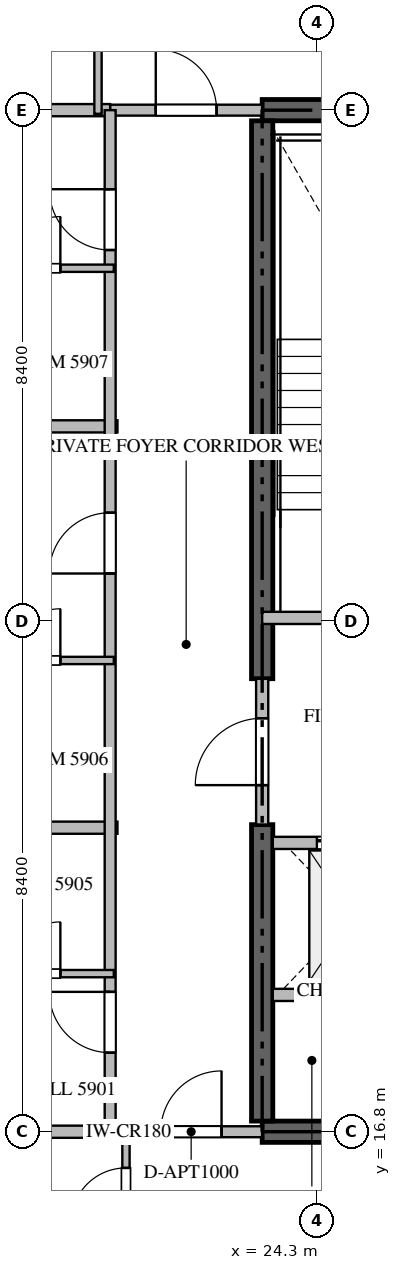
"""IFC4 building model, lengths in metres.
Left out: names, types, materials, properties, quantities, classifications, styles, units other than length and angle.
Written with IfcOpenShell. Run it as: python <this file> out.ifc"""

import sys

from ifc_helpers import new_model, si_unit, direction, frame, frame_2d, origin, place, context, subcontext, project, spatial, rectangle, extrude, source, transform, mapped, element, fill, save


model = new_model("IFC4")
c1 = context("Model", 3, precision=1e-05, world=origin(), true_north=direction((0.0, 1.0)))
c2 = subcontext(c1, "Body", "Model", "MODEL_VIEW")
j1 = project(units=[si_unit("LENGTHUNIT", "METRE"), si_unit("PLANEANGLEUNIT", "RADIAN")], contexts=[c1])
p1 = place(None, origin())
s1 = spatial("IfcSite", under=j1, at=p1, CompositionType="ELEMENT")
p2 = place(p1, origin())
s2 = spatial("IfcBuilding", under=s1, at=p2, CompositionType="ELEMENT")
p3 = place(p2, frame((0.0, 0.0, 237.4)))
s3 = spatial("IfcBuildingStorey", under=s2, at=p3, CompositionType="ELEMENT", Elevation=237.4)
for number, where, z_axis, x_axis in (
    (1, (23.4, 16.8, -0.26), (0.0, 0.0, 1.0), (1.0, 0.0, 0.0)),
    (2, (41.4, 33.6, -0.26), (0.0, 0.0, 1.0), (-1.0, 0.0, 0.0)),
):
    element("IfcWall", number, at=place(p3, frame(where, z_axis=z_axis, x_axis=x_axis)), inside=s3, PredefinedType="SHEAR", context=c2, shape_type="SweptSolid", body=[
        extrude(rectangle(XDim=18.0, YDim=0.35, at=frame_2d((9.0, 0.0))), origin(), (0.0, 0.0, 1.0), 3.848),
    ])
p4 = place(p3, frame((23.4, 16.975, -0.26), z_axis=(0.0, 0.0, 1.0), x_axis=(0.0, 1.0, 0.0)))
e3 = element("IfcWall", 3, at=p4, inside=s3, PredefinedType="SHEAR", context=c2, shape_type="SweptSolid", body=[
    extrude(rectangle(XDim=4.875, YDim=0.35, at=frame_2d((2.438, 0.0))), origin(), (0.0, 0.0, 1.0), 3.848),
])
p5 = place(p3, frame((23.4, 24.25, -0.26), z_axis=(0.0, 0.0, 1.0), x_axis=(0.0, 1.0, 0.0)))
e4 = element("IfcWall", 4, at=p5, inside=s3, PredefinedType="SHEAR", context=c2, shape_type="SweptSolid", body=[
    extrude(rectangle(XDim=9.175, YDim=0.35, at=frame_2d((4.587, 0.0))), origin(), (0.0, 0.0, 1.0), 3.848),
])
p6 = place(p3, frame((23.4, 25.25, 0.0), z_axis=(0.0, 0.0, 1.0), x_axis=(1.0, 0.0, 0.0)))
e5 = element("IfcWall", 5, at=p6, inside=s3, PredefinedType="STANDARD", context=c2, shape_type="SweptSolid", body=[
    extrude(rectangle(XDim=4.45, YDim=0.2, at=frame_2d((2.225, 0.0))), origin(), (0.0, 0.0, 1.0), 3.59),
])
p7 = place(p6, frame((1.65, 0.0, 0.0)))
e6 = element("IfcOpeningElement", 6, at=p7, cuts=e5, PredefinedType="OPENING", context=c2, shape_type="SweptSolid", body=[
    extrude(rectangle(XDim=1.1, YDim=2.15, at=frame_2d((0.55, 1.075))), frame((0.0, 0.11, 0.0), z_axis=(0.0, -1.0, 0.0), x_axis=(1.0, 0.0, 0.0)), (0.0, 0.0, 1.0), 0.22),
])
p8 = place(p3, frame((23.575, 21.55, 0.0), z_axis=(0.0, 0.0, 1.0), x_axis=(1.0, 0.0, 0.0)))
e7 = element("IfcWall", 7, at=p8, inside=s3, PredefinedType="STANDARD", context=c2, shape_type="SweptSolid", body=[
    extrude(rectangle(XDim=2.475, YDim=0.2, at=frame_2d((1.238, 0.0))), origin(), (0.0, 0.0, 1.0), 3.59),
])
p9 = place(p8, frame((0.725, 0.0, 0.0)))
e8 = element("IfcOpeningElement", 8, at=p9, cuts=e7, PredefinedType="OPENING", context=c2, shape_type="SweptSolid", body=[
    extrude(rectangle(XDim=1.2, YDim=2.2, at=frame_2d((0.6, 1.1))), frame((0.0, 0.11, 0.0), z_axis=(0.0, -1.0, 0.0), x_axis=(1.0, 0.0, 0.0)), (0.0, 0.0, 1.0), 0.22),
])
p10 = place(p3, frame((23.575, 19.05, 0.0), z_axis=(0.0, 0.0, 1.0), x_axis=(1.0, 0.0, 0.0)))
e9 = element("IfcWall", 9, at=p10, inside=s3, PredefinedType="STANDARD", context=c2, shape_type="SweptSolid", body=[
    extrude(rectangle(XDim=2.475, YDim=0.2, at=frame_2d((1.238, 0.0))), origin(), (0.0, 0.0, 1.0), 3.59),
])
p11 = place(p3, frame((23.4, 21.852, 0.0), z_axis=(0.0, 0.0, 1.0), x_axis=(0.0, 1.0, 0.0)))
e10 = element("IfcWall", 10, at=p11, inside=s3, PredefinedType="STANDARD", context=c2, shape_type="SweptSolid", body=[
    extrude(rectangle(XDim=2.396, YDim=0.2, at=frame_2d((1.198, 0.0))), origin(), (0.0, 0.0, 1.0), 3.59),
])
p12 = place(p11, frame((0.648, 0.0, 0.0)))
e11 = element("IfcOpeningElement", 11, at=p12, cuts=e10, PredefinedType="OPENING", context=c2, shape_type="SweptSolid", body=[
    extrude(rectangle(XDim=1.1, YDim=2.15, at=frame_2d((0.55, 1.075))), frame((0.0, 0.11, 0.0), z_axis=(0.0, -1.0, 0.0), x_axis=(1.0, 0.0, 0.0)), (0.0, 0.0, 1.0), 0.22),
])
for number, where, z_axis, x_axis in (
    (12, (7.482, 21.8, 0.0), (0.0, 0.0, 1.0), (1.0, 0.0, 0.0)),
    (13, (7.482, 28.4, 0.0), (0.0, 0.0, 1.0), (1.0, 0.0, 0.0)),
):
    element("IfcWall", number, at=place(p3, frame(where, z_axis=z_axis, x_axis=x_axis)), inside=s3, PredefinedType="PARTITIONING", context=c2, shape_type="SweptSolid", body=[
        extrude(rectangle(XDim=13.538, YDim=0.2, at=frame_2d((6.769, 0.0))), origin(), (0.0, 0.0, 1.0), 3.59),
    ])
for number, where, z_axis, x_axis in (
    (14, (7.482, 16.8, 0.0), (0.0, 0.0, 1.0), (1.0, 0.0, 0.0)),
    (15, (7.482, 33.6, 0.0), (0.0, 0.0, 1.0), (1.0, 0.0, 0.0)),
):
    element("IfcWall", number, at=place(p3, frame(where, z_axis=z_axis, x_axis=x_axis)), inside=s3, PredefinedType="PARTITIONING", context=c2, shape_type="SweptSolid", body=[
        extrude(rectangle(XDim=13.418, YDim=0.2, at=frame_2d((6.709, 0.0))), origin(), (0.0, 0.0, 1.0), 3.59),
    ])
p13 = place(p3, frame((20.902, 16.8, 0.0), z_axis=(0.0, 0.0, 1.0), x_axis=(1.0, 0.0, 0.0)))
e16 = element("IfcWall", 16, at=p13, inside=s3, PredefinedType="PARTITIONING", context=c2, shape_type="SweptSolid", body=[
    extrude(rectangle(XDim=2.496, YDim=0.18, at=frame_2d((1.248, 0.0))), origin(), (0.0, 0.0, 1.0), 3.59),
])
p14 = place(p13, frame((0.83, 0.0, 0.0)))
e17 = element("IfcOpeningElement", 17, at=p14, cuts=e16, PredefinedType="OPENING", context=c2, shape_type="SweptSolid", body=[
    extrude(rectangle(XDim=1.0, YDim=2.15, at=frame_2d((0.5, 1.075))), frame((0.0, 0.1, 0.0), z_axis=(0.0, -1.0, 0.0), x_axis=(1.0, 0.0, 0.0)), (0.0, 0.0, 1.0), 0.2),
])
p15 = place(p3, frame((20.902, 33.6, 0.0), z_axis=(0.0, 0.0, 1.0), x_axis=(1.0, 0.0, 0.0)))
e18 = element("IfcWall", 18, at=p15, inside=s3, PredefinedType="PARTITIONING", context=c2, shape_type="SweptSolid", body=[
    extrude(rectangle(XDim=2.496, YDim=0.18, at=frame_2d((1.248, 0.0))), origin(), (0.0, 0.0, 1.0), 3.59),
])
p16 = place(p15, frame((0.748, 0.0, 0.0)))
e19 = element("IfcOpeningElement", 19, at=p16, cuts=e18, PredefinedType="OPENING", context=c2, shape_type="SweptSolid", body=[
    extrude(rectangle(XDim=1.0, YDim=2.15, at=frame_2d((0.5, 1.075))), frame((0.0, 0.1, 0.0), z_axis=(0.0, -1.0, 0.0), x_axis=(1.0, 0.0, 0.0)), (0.0, 0.0, 1.0), 0.2),
])
p17 = place(p3, frame((20.9, 16.8, 0.0), z_axis=(0.0, 0.0, 1.0), x_axis=(0.0, 1.0, 0.0)))
e20 = element("IfcWall", 20, at=p17, inside=s3, PredefinedType="PARTITIONING", context=c2, shape_type="SweptSolid", body=[
    extrude(rectangle(XDim=16.8, YDim=0.18, at=frame_2d((8.4, 0.0))), origin(), (0.0, 0.0, 1.0), 3.59),
])
p18 = place(p17, frame((1.3, 0.0, 0.0)))
e21 = element("IfcOpeningElement", 21, at=p18, cuts=e20, PredefinedType="OPENING", context=c2, shape_type="SweptSolid", body=[
    extrude(rectangle(XDim=1.0, YDim=2.15, at=frame_2d((0.5, 1.075))), frame((0.0, 0.1, 0.0), z_axis=(0.0, -1.0, 0.0), x_axis=(1.0, 0.0, 0.0)), (0.0, 0.0, 1.0), 0.2),
])
p19 = place(p17, frame((9.18, 0.0, 0.0)))
e22 = element("IfcOpeningElement", 22, at=p19, cuts=e20, PredefinedType="OPENING", context=c2, shape_type="SweptSolid", body=[
    extrude(rectangle(XDim=1.0, YDim=2.15, at=frame_2d((0.5, 1.075))), frame((0.0, 0.1, 0.0), z_axis=(0.0, -1.0, 0.0), x_axis=(1.0, 0.0, 0.0)), (0.0, 0.0, 1.0), 0.2),
])
p20 = place(p17, frame((14.5, 0.0, 0.0)))
e23 = element("IfcOpeningElement", 23, at=p20, cuts=e20, PredefinedType="OPENING", context=c2, shape_type="SweptSolid", body=[
    extrude(rectangle(XDim=1.0, YDim=2.15, at=frame_2d((0.5, 1.075))), frame((0.0, 0.1, 0.0), z_axis=(0.0, -1.0, 0.0), x_axis=(1.0, 0.0, 0.0)), (0.0, 0.0, 1.0), 0.2),
])
p21 = place(p3, frame((21.16, 14.65, 0.0), z_axis=(0.0, 0.0, 1.0), x_axis=(0.0, 1.0, 0.0)))
e24 = element("IfcWall", 24, at=p21, inside=s3, PredefinedType="PARTITIONING", context=c2, shape_type="SweptSolid", body=[
    extrude(rectangle(XDim=2.21, YDim=0.12, at=frame_2d((1.105, 0.0))), origin(), (0.0, 0.0, 1.0), 3.59),
])
p22 = place(p21, frame((0.655, 0.0, 0.0)))
e25 = element("IfcOpeningElement", 25, at=p22, cuts=e24, PredefinedType="OPENING", context=c2, shape_type="SweptSolid", body=[
    extrude(rectangle(XDim=0.9, YDim=2.1, at=frame_2d((0.45, 1.05))), frame((0.0, 0.07, 0.0), z_axis=(0.0, -1.0, 0.0), x_axis=(1.0, 0.0, 0.0)), (0.0, 0.0, 1.0), 0.14),
])
p23 = place(p3, frame((20.7, 36.35, 0.0), z_axis=(0.0, 0.0, 1.0), x_axis=(0.0, -1.0, 0.0)))
e26 = element("IfcWall", 26, at=p23, inside=s3, PredefinedType="PARTITIONING", context=c2, shape_type="SweptSolid", body=[
    extrude(rectangle(XDim=2.81, YDim=0.12, at=frame_2d((1.405, 0.0))), origin(), (0.0, 0.0, 1.0), 3.59),
])
p24 = place(p3, frame((18.352, 19.4, 0.0), z_axis=(0.0, 0.0, 1.0), x_axis=(1.0, 0.0, 0.0)))
e27 = element("IfcWall", 27, at=p24, inside=s3, PredefinedType="PARTITIONING", context=c2, shape_type="SweptSolid", body=[
    extrude(rectangle(XDim=2.608, YDim=0.12, at=frame_2d((1.304, 0.0))), origin(), (0.0, 0.0, 1.0), 3.59),
])
p25 = place(p24, frame((0.879, 0.0, 0.0)))
e28 = element("IfcOpeningElement", 28, at=p25, cuts=e27, PredefinedType="OPENING", context=c2, shape_type="SweptSolid", body=[
    extrude(rectangle(XDim=0.85, YDim=2.1, at=frame_2d((0.425, 1.05))), frame((0.0, 0.07, 0.0), z_axis=(0.0, -1.0, 0.0), x_axis=(1.0, 0.0, 0.0)), (0.0, 0.0, 1.0), 0.14),
])
p26 = place(p3, frame((18.352, 24.55, 0.0), z_axis=(0.0, 0.0, 1.0), x_axis=(1.0, 0.0, 0.0)))
e29 = element("IfcWall", 29, at=p26, inside=s3, PredefinedType="PARTITIONING", context=c2, shape_type="SweptSolid", body=[
    extrude(rectangle(XDim=2.608, YDim=0.12, at=frame_2d((1.304, 0.0))), origin(), (0.0, 0.0, 1.0), 3.59),
])
p27 = place(p26, frame((0.879, 0.0, 0.0)))
e30 = element("IfcOpeningElement", 30, at=p27, cuts=e29, PredefinedType="OPENING", context=c2, shape_type="SweptSolid", body=[
    extrude(rectangle(XDim=0.85, YDim=2.1, at=frame_2d((0.425, 1.05))), frame((0.0, 0.07, 0.0), z_axis=(0.0, -1.0, 0.0), x_axis=(1.0, 0.0, 0.0)), (0.0, 0.0, 1.0), 0.14),
])
p28 = place(p3, frame((18.352, 31.0, 0.0), z_axis=(0.0, 0.0, 1.0), x_axis=(1.0, 0.0, 0.0)))
e31 = element("IfcWall", 31, at=p28, inside=s3, PredefinedType="PARTITIONING", context=c2, shape_type="SweptSolid", body=[
    extrude(rectangle(XDim=2.608, YDim=0.12, at=frame_2d((1.304, 0.0))), origin(), (0.0, 0.0, 1.0), 3.59),
])
p29 = place(p28, frame((0.879, 0.0, 0.0)))
e32 = element("IfcOpeningElement", 32, at=p29, cuts=e31, PredefinedType="OPENING", context=c2, shape_type="SweptSolid", body=[
    extrude(rectangle(XDim=0.85, YDim=2.1, at=frame_2d((0.425, 1.05))), frame((0.0, 0.07, 0.0), z_axis=(0.0, -1.0, 0.0), x_axis=(1.0, 0.0, 0.0)), (0.0, 0.0, 1.0), 0.14),
])
m1 = source(origin(), c2, "Body", "SweptSolid", [
    extrude(rectangle(XDim=1.2, YDim=2.2, at=frame_2d((0.6, 1.1))), frame((0.0, 0.025, 0.0), z_axis=(0.0, -1.0, 0.0), x_axis=(1.0, 0.0, 0.0)), (0.0, 0.0, 1.0), 0.05),
])
p30 = place(p9, origin())
e33 = element("IfcDoor", 33, at=p30, inside=s3, OperationType="DOUBLE_DOOR_SLIDING", PredefinedType="DOOR", context=c2, shape_type="MappedRepresentation", body=[
    mapped(m1, transform((0.0, 0.0, 0.0), scale=1.0)),
])
fill(e8, e33)
m2 = source(origin(), c2, "Body", "SweptSolid", [
    extrude(rectangle(XDim=1.1, YDim=2.15, at=frame_2d((0.55, 1.075))), frame((0.0, 0.025, 0.0), z_axis=(0.0, -1.0, 0.0), x_axis=(1.0, 0.0, 0.0)), (0.0, 0.0, 1.0), 0.05),
])
p31 = place(p12, origin())
e34 = element("IfcDoor", 34, at=p31, inside=s3, OperationType="SINGLE_SWING_LEFT", PredefinedType="DOOR", context=c2, shape_type="MappedRepresentation", body=[
    mapped(m2, transform((0.0, 0.0, 0.0), scale=1.0)),
])
fill(e11, e34)
m3 = source(origin(), c2, "Body", "SweptSolid", [
    extrude(rectangle(XDim=1.0, YDim=2.15, at=frame_2d((0.5, 1.075))), frame((0.0, 0.025, 0.0), z_axis=(0.0, -1.0, 0.0), x_axis=(1.0, 0.0, 0.0)), (0.0, 0.0, 1.0), 0.05),
])
p32 = place(p14, origin())
e35 = element("IfcDoor", 35, at=p32, inside=s3, OperationType="SINGLE_SWING_RIGHT", PredefinedType="DOOR", context=c2, shape_type="MappedRepresentation", body=[
    mapped(m3, transform((0.0, 0.0, 0.0), scale=1.0)),
])
fill(e17, e35)
p33 = place(p16, origin())
e36 = element("IfcDoor", 36, at=p33, inside=s3, OperationType="SINGLE_SWING_LEFT", PredefinedType="DOOR", context=c2, shape_type="MappedRepresentation", body=[
    mapped(m3, transform((0.0, 0.0, 0.0), scale=1.0)),
])
fill(e19, e36)
p34 = place(p18, origin())
e37 = element("IfcDoor", 37, at=p34, inside=s3, OperationType="SINGLE_SWING_RIGHT", PredefinedType="DOOR", context=c2, shape_type="MappedRepresentation", body=[
    mapped(m3, transform((0.0, 0.0, 0.0), scale=1.0)),
])
fill(e21, e37)
p35 = place(p19, origin())
e38 = element("IfcDoor", 38, at=p35, inside=s3, OperationType="SINGLE_SWING_LEFT", PredefinedType="DOOR", context=c2, shape_type="MappedRepresentation", body=[
    mapped(m3, transform((0.0, 0.0, 0.0), scale=1.0)),
])
fill(e22, e38)
p36 = place(p20, origin())
e39 = element("IfcDoor", 39, at=p36, inside=s3, OperationType="SINGLE_SWING_RIGHT", PredefinedType="DOOR", context=c2, shape_type="MappedRepresentation", body=[
    mapped(m3, transform((0.0, 0.0, 0.0), scale=1.0)),
])
fill(e23, e39)
m4 = source(origin(), c2, "Body", "SweptSolid", [
    extrude(rectangle(XDim=0.9, YDim=2.1, at=frame_2d((0.45, 1.05))), frame((0.0, 0.025, 0.0), z_axis=(0.0, -1.0, 0.0), x_axis=(1.0, 0.0, 0.0)), (0.0, 0.0, 1.0), 0.05),
])
p37 = place(p22, origin())
e40 = element("IfcDoor", 40, at=p37, inside=s3, OperationType="SINGLE_SWING_LEFT", PredefinedType="DOOR", context=c2, shape_type="MappedRepresentation", body=[
    mapped(m4, transform((0.0, 0.0, 0.0), scale=1.0)),
])
fill(e25, e40)
m5 = source(origin(), c2, "Body", "SweptSolid", [
    extrude(rectangle(XDim=0.85, YDim=2.1, at=frame_2d((0.425, 1.05))), frame((0.0, 0.025, 0.0), z_axis=(0.0, -1.0, 0.0), x_axis=(1.0, 0.0, 0.0)), (0.0, 0.0, 1.0), 0.05),
])
p38 = place(p25, origin())
e41 = element("IfcDoor", 41, at=p38, inside=s3, OperationType="SINGLE_SWING_RIGHT", PredefinedType="DOOR", context=c2, shape_type="MappedRepresentation", body=[
    mapped(m5, transform((0.0, 0.0, 0.0), scale=1.0)),
])
fill(e28, e41)
p39 = place(p27, origin())
e42 = element("IfcDoor", 42, at=p39, inside=s3, OperationType="SINGLE_SWING_RIGHT", PredefinedType="DOOR", context=c2, shape_type="MappedRepresentation", body=[
    mapped(m5, transform((0.0, 0.0, 0.0), scale=1.0)),
])
fill(e30, e42)
p40 = place(p29, origin())
e43 = element("IfcDoor", 43, at=p40, inside=s3, OperationType="SINGLE_SWING_RIGHT", PredefinedType="DOOR", context=c2, shape_type="MappedRepresentation", body=[
    mapped(m5, transform((0.0, 0.0, 0.0), scale=1.0)),
])
fill(e32, e43)
save(model, sys.argv[1])
